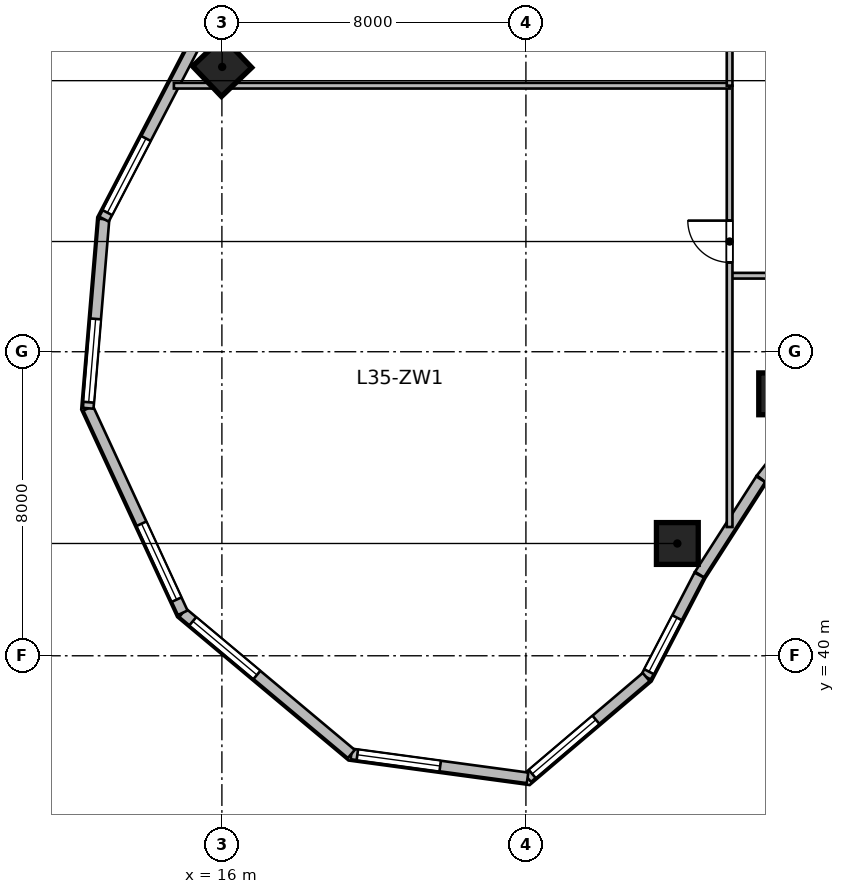
"""IFC4 building model, lengths in metres.
Left out: names, types, materials, properties, quantities, classifications, styles, units other than length and angle.
Written with IfcOpenShell. Run it as: python <this file> out.ifc"""

import sys

from ifc_helpers import new_model, si_unit, direction, frame, frame_2d, origin, origin_2d, place, context, subcontext, project, spatial, rectangle, circle, extrude, source, transform, mapped, element, fill, save


model = new_model("IFC4")
c1 = context("Model", 3, precision=1e-05, world=origin(), true_north=direction((0.0, 1.0)))
c2 = subcontext(c1, "Body", "Model", "MODEL_VIEW")
j1 = project(units=[si_unit("LENGTHUNIT", "METRE"), si_unit("PLANEANGLEUNIT", "RADIAN")], contexts=[c1])
p1 = place(None, origin())
s1 = spatial("IfcSite", under=j1, at=p1, CompositionType="ELEMENT")
p2 = place(p1, origin())
s2 = spatial("IfcBuilding", under=s1, at=p2, CompositionType="ELEMENT")
p3 = place(p2, frame((0.0, 0.0, 146.7)))
s3 = spatial("IfcBuildingStorey", under=s2, at=p3, CompositionType="ELEMENT", Elevation=146.7)
m1 = source(origin(), c2, "Body", "SweptSolid", [
    extrude(circle(Radius=0.55, at=origin_2d()), origin(), (0.0, 0.0, 1.0), 3.9),
])
p4 = place(p3, frame((27.985, 42.955, 0.0), z_axis=(0.0, 0.0, 1.0), x_axis=(-0.690756218984, 0.723087716626, 0.0)))
e1 = element("IfcColumn", 1, at=p4, inside=s3, PredefinedType="COLUMN", context=c2, shape_type="MappedRepresentation", body=[
    mapped(m1, transform((0.0, 0.0, 0.0), scale=1.0)),
])
m2 = source(origin(), c2, "Body", "SweptSolid", [
    extrude(rectangle(XDim=1.1, YDim=1.1, at=origin_2d()), origin(), (0.0, 0.0, 1.0), 3.9),
])
p5 = place(p3, frame((16.007, 55.494, 0.0), z_axis=(0.0, 0.0, 1.0), x_axis=(-0.690756218984, 0.723087716626, 0.0)))
e2 = element("IfcColumn", 2, at=p5, inside=s3, PredefinedType="COLUMN", context=c2, shape_type="MappedRepresentation", body=[
    mapped(m2, transform((0.0, 0.0, 0.0), scale=1.0)),
])
p6 = place(p3, frame((30.677, 46.892, 0.0), z_axis=(0.0, 0.0, 1.0), x_axis=(-0.571143442153, 0.820850271661, 0.0)))
e3 = element("IfcColumn", 3, at=p6, inside=s3, PredefinedType="COLUMN", context=c2, shape_type="MappedRepresentation", body=[
    mapped(m1, transform((0.0, 0.0, 0.0), scale=1.0)),
])
m3 = source(origin(), c2, "Body", "SweptSolid", [
    extrude(rectangle(XDim=2.897, YDim=0.28, at=frame_2d((1.448, 0.0))), origin(), (0.0, 0.0, 1.0), 3.65),
])
p7 = place(p3, frame((31.979, 46.936, 0.0), z_axis=(0.0, 0.0, 1.0), x_axis=(-0.618167636915, -0.786046291685, 0.0)))
e4 = element("IfcWall", 4, at=p7, inside=s3, PredefinedType="SOLIDWALL", context=c2, shape_type="MappedRepresentation", body=[
    mapped(m3, transform((0.0, 0.0, 0.0), scale=1.0)),
])
m4 = source(origin(), c2, "Body", "SweptSolid", [
    extrude(rectangle(XDim=2.981, YDim=0.28, at=frame_2d((1.49, 0.0))), origin(), (0.0, 0.0, 1.0), 3.65),
])
p8 = place(p3, frame((30.179, 44.645, 0.0), z_axis=(0.0, 0.0, 1.0), x_axis=(-0.540194451908, -0.841540227278, 0.0)))
e5 = element("IfcWall", 5, at=p8, inside=s3, PredefinedType="SOLIDWALL", context=c2, shape_type="MappedRepresentation", body=[
    mapped(m4, transform((0.0, 0.0, 0.0), scale=1.0)),
])
m5 = source(origin(), c2, "Body", "SweptSolid", [
    extrude(rectangle(XDim=3.024, YDim=0.28, at=frame_2d((1.512, 0.0))), origin(), (0.0, 0.0, 1.0), 3.65),
])
p9 = place(p3, frame((28.561, 42.123, 0.0), z_axis=(0.0, 0.0, 1.0), x_axis=(-0.461718746531, -0.887026380161, 0.0)))
e6 = element("IfcWall", 6, at=p9, inside=s3, PredefinedType="SOLIDWALL", context=c2, shape_type="MappedRepresentation", body=[
    mapped(m5, transform((0.0, 0.0, 0.0), scale=1.0)),
])
p10 = place(p9, frame((1.264, 0.0, 0.95)))
e7 = element("IfcOpeningElement", 7, at=p10, cuts=e6, PredefinedType="OPENING", context=c2, shape_type="SweptSolid", body=[
    extrude(rectangle(XDim=1.6, YDim=1.9, at=frame_2d((0.8, 0.95))), frame((0.0, 0.15, 0.0), z_axis=(0.0, -1.0, 0.0), x_axis=(1.0, 0.0, 0.0)), (0.0, 0.0, 1.0), 0.3),
])
m6 = source(origin(), c2, "Body", "SweptSolid", [
    extrude(rectangle(XDim=4.096, YDim=0.28, at=frame_2d((2.048, 0.0))), origin(), (0.0, 0.0, 1.0), 3.65),
])
p11 = place(p3, frame((27.164, 39.44, 0.0), z_axis=(0.0, 0.0, 1.0), x_axis=(-0.761926081737, -0.647663991564, 0.0)))
e8 = element("IfcWall", 8, at=p11, inside=s3, PredefinedType="SOLIDWALL", context=c2, shape_type="MappedRepresentation", body=[
    mapped(m6, transform((0.0, 0.0, 0.0), scale=1.0)),
])
p12 = place(p11, frame((1.736, 0.0, 0.95)))
e9 = element("IfcOpeningElement", 9, at=p12, cuts=e8, PredefinedType="OPENING", context=c2, shape_type="SweptSolid", body=[
    extrude(rectangle(XDim=2.2, YDim=2.1, at=frame_2d((1.1, 1.05))), frame((0.0, 0.15, 0.0), z_axis=(0.0, -1.0, 0.0), x_axis=(1.0, 0.0, 0.0)), (0.0, 0.0, 1.0), 0.3),
])
m7 = source(origin(), c2, "Body", "SweptSolid", [
    extrude(rectangle(XDim=4.68, YDim=0.28, at=frame_2d((2.34, 0.0))), origin(), (0.0, 0.0, 1.0), 3.65),
])
p13 = place(p3, frame((24.043, 36.788, 0.0), z_axis=(0.0, 0.0, 1.0), x_axis=(-0.990931146435, 0.134370618162, 0.0)))
e10 = element("IfcWall", 10, at=p13, inside=s3, PredefinedType="SOLIDWALL", context=c2, shape_type="MappedRepresentation", body=[
    mapped(m7, transform((0.0, 0.0, 0.0), scale=1.0)),
])
p14 = place(p13, frame((2.32, 0.0, 0.95)))
e11 = element("IfcOpeningElement", 11, at=p14, cuts=e10, PredefinedType="OPENING", context=c2, shape_type="SweptSolid", body=[
    extrude(rectangle(XDim=2.2, YDim=2.1, at=frame_2d((1.1, 1.05))), frame((0.0, 0.15, 0.0), z_axis=(0.0, -1.0, 0.0), x_axis=(1.0, 0.0, 0.0)), (0.0, 0.0, 1.0), 0.3),
])
m8 = source(origin(), c2, "Body", "SweptSolid", [
    extrude(rectangle(XDim=5.786, YDim=0.28, at=frame_2d((2.893, 0.0))), origin(), (0.0, 0.0, 1.0), 3.65),
])
p15 = place(p3, frame((19.406, 37.417, 0.0), z_axis=(0.0, 0.0, 1.0), x_axis=(-0.766711306852, 0.641992034176, 0.0)))
e12 = element("IfcWall", 12, at=p15, inside=s3, PredefinedType="SOLIDWALL", context=c2, shape_type="MappedRepresentation", body=[
    mapped(m8, transform((0.0, 0.0, 0.0), scale=1.0)),
])
p16 = place(p15, frame((3.24, 0.0, 0.95)))
e13 = element("IfcOpeningElement", 13, at=p16, cuts=e12, PredefinedType="OPENING", context=c2, shape_type="SweptSolid", body=[
    extrude(rectangle(XDim=2.2, YDim=2.1, at=frame_2d((1.1, 1.05))), frame((0.0, 0.15, 0.0), z_axis=(0.0, -1.0, 0.0), x_axis=(1.0, 0.0, 0.0)), (0.0, 0.0, 1.0), 0.3),
])
m9 = source(origin(), c2, "Body", "SweptSolid", [
    extrude(rectangle(XDim=5.927, YDim=0.28, at=frame_2d((2.964, 0.0))), origin(), (0.0, 0.0, 1.0), 3.65),
])
p17 = place(p3, frame((14.969, 41.131, 0.0), z_axis=(0.0, 0.0, 1.0), x_axis=(-0.419656204795, 0.907683132914, 0.0)))
e14 = element("IfcWall", 14, at=p17, inside=s3, PredefinedType="SOLIDWALL", context=c2, shape_type="MappedRepresentation", body=[
    mapped(m9, transform((0.0, 0.0, 0.0), scale=1.0)),
])
p18 = place(p17, frame((0.382, 0.0, 0.95)))
e15 = element("IfcOpeningElement", 15, at=p18, cuts=e14, PredefinedType="OPENING", context=c2, shape_type="SweptSolid", body=[
    extrude(rectangle(XDim=2.2, YDim=2.1, at=frame_2d((1.1, 1.05))), frame((0.0, 0.15, 0.0), z_axis=(0.0, -1.0, 0.0), x_axis=(1.0, 0.0, 0.0)), (0.0, 0.0, 1.0), 0.3),
])
m10 = source(origin(), c2, "Body", "SweptSolid", [
    extrude(rectangle(XDim=4.994, YDim=0.28, at=frame_2d((2.497, 0.0))), origin(), (0.0, 0.0, 1.0), 3.65),
])
p19 = place(p3, frame((12.481, 46.512, 0.0), z_axis=(0.0, 0.0, 1.0), x_axis=(0.083344839916, 0.996520766296, 0.0)))
e16 = element("IfcWall", 16, at=p19, inside=s3, PredefinedType="SOLIDWALL", context=c2, shape_type="MappedRepresentation", body=[
    mapped(m10, transform((0.0, 0.0, 0.0), scale=1.0)),
])
p20 = place(p19, frame((0.16, 0.0, 0.95)))
e17 = element("IfcOpeningElement", 17, at=p20, cuts=e16, PredefinedType="OPENING", context=c2, shape_type="SweptSolid", body=[
    extrude(rectangle(XDim=2.2, YDim=2.1, at=frame_2d((1.1, 1.05))), frame((0.0, 0.15, 0.0), z_axis=(0.0, -1.0, 0.0), x_axis=(1.0, 0.0, 0.0)), (0.0, 0.0, 1.0), 0.3),
])
m11 = source(origin(), c2, "Body", "SweptSolid", [
    extrude(rectangle(XDim=5.171, YDim=0.28, at=frame_2d((2.585, 0.0))), origin(), (0.0, 0.0, 1.0), 3.65),
])
p21 = place(p3, frame((12.898, 51.489, 0.0), z_axis=(0.0, 0.0, 1.0), x_axis=(0.461752581363, 0.887008767491, 0.0)))
e18 = element("IfcWall", 18, at=p21, inside=s3, PredefinedType="SOLIDWALL", context=c2, shape_type="MappedRepresentation", body=[
    mapped(m11, transform((0.0, 0.0, 0.0), scale=1.0)),
])
p22 = place(p21, frame((0.193, 0.0, 0.95)))
e19 = element("IfcOpeningElement", 19, at=p22, cuts=e18, PredefinedType="OPENING", context=c2, shape_type="SweptSolid", body=[
    extrude(rectangle(XDim=2.2, YDim=2.1, at=frame_2d((1.1, 1.05))), frame((0.0, 0.15, 0.0), z_axis=(0.0, -1.0, 0.0), x_axis=(1.0, 0.0, 0.0)), (0.0, 0.0, 1.0), 0.3),
])
m12 = source(origin(), c2, "Body", "SweptSolid", [
    extrude(rectangle(XDim=2.5, YDim=0.15, at=frame_2d((1.25, 0.0))), origin(), (0.0, 0.0, 1.0), 3.65),
])
p23 = place(p3, frame((29.4, 50.0, 0.0), z_axis=(0.0, 0.0, 1.0), x_axis=(1.0, 0.0, 0.0)))
e20 = element("IfcWall", 20, at=p23, inside=s3, PredefinedType="PARTITIONING", context=c2, shape_type="MappedRepresentation", body=[
    mapped(m12, transform((0.0, 0.0, 0.0), scale=1.0)),
])
m13 = source(origin(), c2, "Body", "SweptSolid", [
    extrude(rectangle(XDim=11.612, YDim=0.15, at=frame_2d((5.806, 0.0))), origin(), (0.0, 0.0, 1.0), 2.942),
])
p24 = place(p3, frame((29.36, 43.388, 0.0), z_axis=(0.0, 0.0, 1.0), x_axis=(0.0, 1.0, 0.0)))
e21 = element("IfcWall", 21, at=p24, inside=s3, PredefinedType="PARTITIONING", context=c2, shape_type="MappedRepresentation", body=[
    mapped(m13, transform((0.0, 0.0, 0.0), scale=1.0)),
])
p25 = place(p24, frame((6.962, 0.0, 0.0)))
e22 = element("IfcOpeningElement", 22, at=p25, cuts=e21, PredefinedType="OPENING", context=c2, shape_type="SweptSolid", body=[
    extrude(rectangle(XDim=1.1, YDim=2.15, at=frame_2d((0.55, 1.075))), frame((0.0, 0.085, 0.0), z_axis=(0.0, -1.0, 0.0), x_axis=(1.0, 0.0, 0.0)), (0.0, 0.0, 1.0), 0.17),
])
m14 = source(origin(), c2, "Body", "SweptSolid", [
    extrude(rectangle(XDim=14.623, YDim=0.15, at=frame_2d((7.312, 0.0))), origin(), (0.0, 0.0, 1.0), 3.65),
])
p26 = place(p3, frame((14.737, 55.0, 0.0), z_axis=(0.0, 0.0, 1.0), x_axis=(1.0, 0.0, 0.0)))
e23 = element("IfcWall", 23, at=p26, inside=s3, PredefinedType="PARTITIONING", context=c2, shape_type="MappedRepresentation", body=[
    mapped(m14, transform((0.0, 0.0, 0.0), scale=1.0)),
])
m15 = source(origin(), c2, "Body", "SweptSolid", [
    extrude(rectangle(XDim=8.5, YDim=0.15, at=frame_2d((4.25, 0.0))), origin(), (0.0, 0.0, 1.0), 2.942),
])
p27 = place(p3, frame((29.36, 55.0, 0.0), z_axis=(0.0, 0.0, 1.0), x_axis=(0.0, 1.0, 0.0)))
e24 = element("IfcWall", 24, at=p27, inside=s3, PredefinedType="PARTITIONING", context=c2, shape_type="MappedRepresentation", body=[
    mapped(m15, transform((0.0, 0.0, 0.0), scale=1.0)),
])
p28 = place(p27, frame((3.7, 0.0, 0.0)))
e25 = element("IfcOpeningElement", 25, at=p28, cuts=e24, PredefinedType="OPENING", context=c2, shape_type="SweptSolid", body=[
    extrude(rectangle(XDim=1.1, YDim=2.15, at=frame_2d((0.55, 1.075))), frame((0.0, 0.085, 0.0), z_axis=(0.0, -1.0, 0.0), x_axis=(1.0, 0.0, 0.0)), (0.0, 0.0, 1.0), 0.17),
])
m16 = source(origin(), c2, "Body", "SweptSolid", [
    extrude(rectangle(XDim=1.6, YDim=1.9, at=frame_2d((0.8, 0.95))), frame((0.0, 0.03, 0.0), z_axis=(0.0, -1.0, 0.0), x_axis=(1.0, 0.0, 0.0)), (0.0, 0.0, 1.0), 0.06),
])
p29 = place(p10, origin())
e26 = element("IfcWindow", 26, at=p29, inside=s3, PartitioningType="SINGLE_PANEL", PredefinedType="WINDOW", context=c2, shape_type="MappedRepresentation", body=[
    mapped(m16, transform((0.0, 0.0, 0.0), scale=1.0)),
])
fill(e7, e26)
m17 = source(origin(), c2, "Body", "SweptSolid", [
    extrude(rectangle(XDim=2.2, YDim=2.1, at=frame_2d((1.1, 1.05))), frame((0.0, 0.03, 0.0), z_axis=(0.0, -1.0, 0.0), x_axis=(1.0, 0.0, 0.0)), (0.0, 0.0, 1.0), 0.06),
])
p30 = place(p12, origin())
e27 = element("IfcWindow", 27, at=p30, inside=s3, PartitioningType="TRIPLE_PANEL_VERTICAL", PredefinedType="WINDOW", context=c2, shape_type="MappedRepresentation", body=[
    mapped(m17, transform((0.0, 0.0, 0.0), scale=1.0)),
])
fill(e9, e27)
p31 = place(p14, origin())
e28 = element("IfcWindow", 28, at=p31, inside=s3, PartitioningType="TRIPLE_PANEL_VERTICAL", PredefinedType="WINDOW", context=c2, shape_type="MappedRepresentation", body=[
    mapped(m17, transform((0.0, 0.0, 0.0), scale=1.0)),
])
fill(e11, e28)
p32 = place(p16, origin())
e29 = element("IfcWindow", 29, at=p32, inside=s3, PartitioningType="TRIPLE_PANEL_VERTICAL", PredefinedType="WINDOW", context=c2, shape_type="MappedRepresentation", body=[
    mapped(m17, transform((0.0, 0.0, 0.0), scale=1.0)),
])
fill(e13, e29)
p33 = place(p18, origin())
e30 = element("IfcWindow", 30, at=p33, inside=s3, PartitioningType="TRIPLE_PANEL_VERTICAL", PredefinedType="WINDOW", context=c2, shape_type="MappedRepresentation", body=[
    mapped(m17, transform((0.0, 0.0, 0.0), scale=1.0)),
])
fill(e15, e30)
p34 = place(p20, origin())
e31 = element("IfcWindow", 31, at=p34, inside=s3, PartitioningType="TRIPLE_PANEL_VERTICAL", PredefinedType="WINDOW", context=c2, shape_type="MappedRepresentation", body=[
    mapped(m17, transform((0.0, 0.0, 0.0), scale=1.0)),
])
fill(e17, e31)
p35 = place(p22, origin())
e32 = element("IfcWindow", 32, at=p35, inside=s3, PartitioningType="TRIPLE_PANEL_VERTICAL", PredefinedType="WINDOW", context=c2, shape_type="MappedRepresentation", body=[
    mapped(m17, transform((0.0, 0.0, 0.0), scale=1.0)),
])
fill(e19, e32)
m18 = source(origin(), c2, "Body", "SweptSolid", [
    extrude(rectangle(XDim=1.1, YDim=2.15, at=frame_2d((0.55, 1.075))), frame((0.0, 0.025, 0.0), z_axis=(0.0, -1.0, 0.0), x_axis=(1.0, 0.0, 0.0)), (0.0, 0.0, 1.0), 0.05),
])
p36 = place(p25, origin())
e33 = element("IfcDoor", 33, at=p36, inside=s3, OperationType="SINGLE_SWING_RIGHT", PredefinedType="DOOR", context=c2, shape_type="MappedRepresentation", body=[
    mapped(m18, transform((0.0, 0.0, 0.0), scale=1.0)),
])
fill(e22, e33)
save(model, sys.argv[1])
